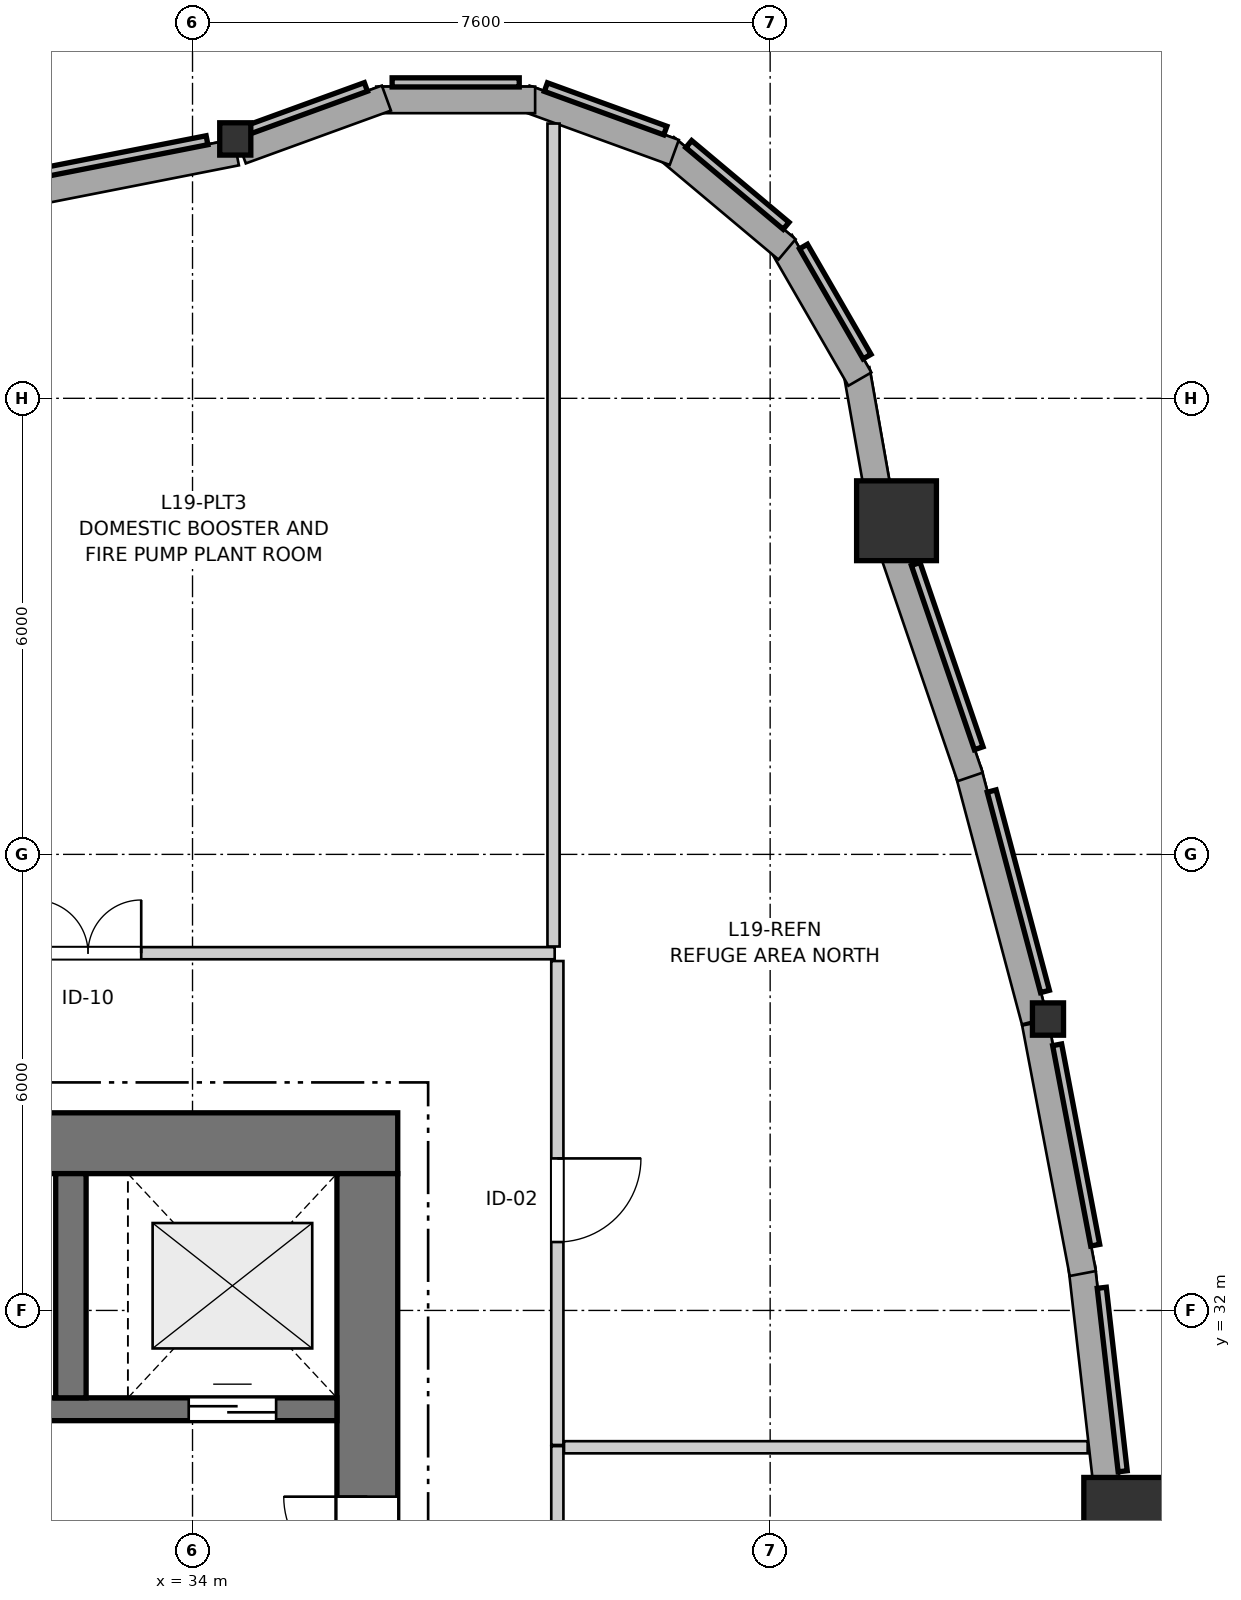
"""IFC4 building model, lengths in metres.
Left out: names, types, materials, properties, quantities, classifications, styles, units other than length and angle.
Written with IfcOpenShell. Run it as: python <this file> out.ifc"""

import sys

from ifc_helpers import new_model, si_unit, direction, frame, frame_2d, origin, origin_2d, place, context, subcontext, project, spatial, rectangle, i_section, extrude, source, transform, mapped, element, fill, save


model = new_model("IFC4")
c1 = context("Model", 3, precision=1e-05, world=origin(), true_north=direction((0.0, 1.0)))
c2 = subcontext(c1, "Body", "Model", "MODEL_VIEW")
j1 = project(units=[si_unit("LENGTHUNIT", "METRE"), si_unit("PLANEANGLEUNIT", "RADIAN")], contexts=[c1])
p1 = place(None, origin())
s1 = spatial("IfcSite", under=j1, at=p1, CompositionType="ELEMENT")
p2 = place(p1, origin())
s2 = spatial("IfcBuilding", under=s1, at=p2, CompositionType="ELEMENT")
p3 = place(p2, frame((0.0, 0.0, 65.4)))
s3 = spatial("IfcBuildingStorey", under=s2, at=p3, CompositionType="ELEMENT", Elevation=65.4)
p4 = place(p3, frame((36.7, 34.2, 0.0), z_axis=(0.0, 0.0, 1.0), x_axis=(-1.0, 0.0, 0.0)))
e1 = element("IfcWall", 1, at=p4, inside=s3, PredefinedType="SHEAR", context=c2, shape_type="SweptSolid", body=[
    extrude(rectangle(XDim=12.7, YDim=0.8, at=frame_2d((6.35, 0.0))), origin(), (0.0, 0.0, 1.0), 4.75),
])
p5 = place(p3, frame((36.3, 18.2, 0.0), z_axis=(0.0, 0.0, 1.0), x_axis=(0.0, 1.0, 0.0)))
e2 = element("IfcWall", 2, at=p5, inside=s3, PredefinedType="SHEAR", context=c2, shape_type="SweptSolid", body=[
    extrude(rectangle(XDim=15.6, YDim=0.8, at=frame_2d((7.8, 0.0))), origin(), (0.0, 0.0, 1.0), 4.75),
])
p6 = place(p5, frame((4.25, 0.0, 0.0)))
e3 = element("IfcOpeningElement", 3, at=p6, cuts=e2, PredefinedType="OPENING", context=c2, shape_type="SweptSolid", body=[
    extrude(rectangle(XDim=1.1, YDim=2.15, at=frame_2d((0.55, 1.075))), frame((0.0, 0.41, 0.0), z_axis=(0.0, -1.0, 0.0), x_axis=(1.0, 0.0, 0.0)), (0.0, 0.0, 1.0), 0.82),
])
p7 = place(p5, frame((10.25, 0.0, 0.0)))
e4 = element("IfcOpeningElement", 4, at=p7, cuts=e2, PredefinedType="OPENING", context=c2, shape_type="SweptSolid", body=[
    extrude(rectangle(XDim=1.1, YDim=2.15, at=frame_2d((0.55, 1.075))), frame((0.0, 0.41, 0.0), z_axis=(0.0, -1.0, 0.0), x_axis=(1.0, 0.0, 0.0)), (0.0, 0.0, 1.0), 0.82),
])
p8 = place(p3, frame((24.8, 30.7, 0.0), z_axis=(0.0, 0.0, 1.0), x_axis=(1.0, 0.0, 0.0)))
e5 = element("IfcWall", 5, at=p8, inside=s3, PredefinedType="SHEAR", context=c2, shape_type="SweptSolid", body=[
    extrude(rectangle(XDim=11.1, YDim=0.3, at=frame_2d((5.55, 0.0))), origin(), (0.0, 0.0, 1.0), 4.75),
])
p9 = place(p8, frame((6.22, 0.0, 0.0)))
e6 = element("IfcOpeningElement", 6, at=p9, cuts=e5, PredefinedType="OPENING", context=c2, shape_type="SweptSolid", body=[
    extrude(rectangle(XDim=0.98, YDim=2.15, at=frame_2d((0.49, 1.075))), frame((0.0, 0.16, 0.0), z_axis=(0.0, -1.0, 0.0), x_axis=(1.0, 0.0, 0.0)), (0.0, 0.0, 1.0), 0.32),
])
p10 = place(p8, frame((9.15, 0.0, 0.0)))
e7 = element("IfcOpeningElement", 7, at=p10, cuts=e5, PredefinedType="OPENING", context=c2, shape_type="SweptSolid", body=[
    extrude(rectangle(XDim=1.15, YDim=2.15, at=frame_2d((0.575, 1.075))), frame((0.0, 0.16, 0.0), z_axis=(0.0, -1.0, 0.0), x_axis=(1.0, 0.0, 0.0)), (0.0, 0.0, 1.0), 0.32),
])
p11 = place(p3, frame((32.4, 30.85, 0.0), z_axis=(0.0, 0.0, 1.0), x_axis=(0.0, 1.0, 0.0)))
e8 = element("IfcWall", 8, at=p11, inside=s3, PredefinedType="SHEAR", context=c2, shape_type="SweptSolid", body=[
    extrude(rectangle(XDim=2.95, YDim=0.4, at=frame_2d((1.475, 0.0))), origin(), (0.0, 0.0, 1.0), 4.75),
])
m1 = source(origin(), c2, "Body", "SweptSolid", [
    extrude(rectangle(XDim=1.05, YDim=1.05, at=origin_2d()), origin(), (0.0, 0.0, 1.0), 4.75),
])
p12 = place(p3, frame((46.252, 29.278, 0.0), z_axis=(0.0, 0.0, 1.0), x_axis=(1.0, 0.0, 0.0)))
e9 = element("IfcColumn", 9, at=p12, inside=s3, PredefinedType="COLUMN", context=c2, shape_type="MappedRepresentation", body=[
    mapped(m1, transform((0.0, 0.0, 0.0), x_axis=(1.0, 0.0, 0.0), y_axis=(0.0, 1.0, 0.0), z_axis=(0.0, 0.0, 1.0), scale=1.0)),
])
m2 = source(origin(), c2, "Body", "SweptSolid", [
    extrude(i_section(OverallWidth=0.409, OverallDepth=0.425, WebThickness=0.03, FlangeThickness=0.048, FilletRadius=0.015, at=origin_2d()), origin(), (0.0, 0.0, 1.0), 4.75),
])
p13 = place(p3, frame((45.256, 35.834, 0.0), z_axis=(0.0, 0.0, 1.0), x_axis=(1.0, 0.0, 0.0)))
e10 = element("IfcColumn", 10, at=p13, inside=s3, PredefinedType="PILASTER", context=c2, shape_type="MappedRepresentation", body=[
    mapped(m2, transform((0.0, 0.0, 0.0), x_axis=(1.0, 0.0, 0.0), y_axis=(0.0, 1.0, 0.0), z_axis=(0.0, 0.0, 1.0), scale=1.0)),
])
p14 = place(p3, frame((43.262, 42.389, 0.0), z_axis=(0.0, 0.0, 1.0), x_axis=(1.0, 0.0, 0.0)))
e11 = element("IfcColumn", 11, at=p14, inside=s3, PredefinedType="COLUMN", context=c2, shape_type="MappedRepresentation", body=[
    mapped(m1, transform((0.0, 0.0, 0.0), x_axis=(1.0, 0.0, 0.0), y_axis=(0.0, 1.0, 0.0), z_axis=(0.0, 0.0, 1.0), scale=1.0)),
])
p15 = place(p3, frame((34.562, 47.413, 0.0), z_axis=(0.0, 0.0, 1.0), x_axis=(1.0, 0.0, 0.0)))
e12 = element("IfcColumn", 12, at=p15, inside=s3, PredefinedType="PILASTER", context=c2, shape_type="MappedRepresentation", body=[
    mapped(m2, transform((0.0, 0.0, 0.0), x_axis=(1.0, 0.0, 0.0), y_axis=(0.0, 1.0, 0.0), z_axis=(0.0, 0.0, 1.0), scale=1.0)),
])
p16 = place(p3, frame((46.044, 29.556, 0.0), z_axis=(0.0, 0.0, 1.0), x_axis=(-0.113263196818, 0.993565019637, 0.0)))
e13 = element("IfcWall", 13, at=p16, inside=s3, PredefinedType="SOLIDWALL", context=c2, shape_type="SweptSolid", body=[
    extrude(rectangle(XDim=3.037, YDim=0.35, at=frame_2d((1.519, 0.0))), origin(), (0.0, 0.0, 1.0), 4.23),
])
p17 = place(p3, frame((45.713, 32.486, 0.0), z_axis=(0.0, 0.0, 1.0), x_axis=(-0.186603748992, 0.982435260392, 0.0)))
e14 = element("IfcWall", 14, at=p17, inside=s3, PredefinedType="SOLIDWALL", context=c2, shape_type="SweptSolid", body=[
    extrude(rectangle(XDim=3.354, YDim=0.35, at=frame_2d((1.677, 0.0))), origin(), (0.0, 0.0, 1.0), 4.23),
])
p18 = place(p3, frame((45.081, 35.808, 0.0), z_axis=(0.0, 0.0, 1.0), x_axis=(-0.257114470429, 0.966380954436, 0.0)))
e15 = element("IfcWall", 15, at=p18, inside=s3, PredefinedType="SOLIDWALL", context=c2, shape_type="SweptSolid", body=[
    extrude(rectangle(XDim=3.41, YDim=0.35, at=frame_2d((1.705, 0.0))), origin(), (0.0, 0.0, 1.0), 4.23),
])
p19 = place(p3, frame((44.23, 39.019, 0.0), z_axis=(0.0, 0.0, 1.0), x_axis=(-0.323560153501, 0.94620760252, 0.0)))
e16 = element("IfcWall", 16, at=p19, inside=s3, PredefinedType="SOLIDWALL", context=c2, shape_type="SweptSolid", body=[
    extrude(rectangle(XDim=3.202, YDim=0.35, at=frame_2d((1.601, 0.0))), origin(), (0.0, 0.0, 1.0), 4.23),
])
p20 = place(p3, frame((43.038, 42.655, 0.0), z_axis=(0.0, 0.0, 1.0), x_axis=(-0.173610462023, 0.984814402553, 0.0)))
e17 = element("IfcWall", 17, at=p20, inside=s3, PredefinedType="SOLIDWALL", context=c2, shape_type="SweptSolid", body=[
    extrude(rectangle(XDim=1.752, YDim=0.35, at=frame_2d((0.876, 0.0))), origin(), (0.0, 0.0, 1.0), 4.23),
])
for number, where, z_axis, x_axis in (
    (18, (42.78, 44.253, 0.0), (0.0, 0.0, 1.0), (-0.5, 0.866, 0.0)),
    (19, (41.822, 45.959, 0.0), (0.0, 0.0, 1.0), (-0.766, 0.643, 0.0)),
    (20, (40.338, 47.235, 0.0), (0.0, 0.0, 1.0), (-0.94, 0.342, 0.0)),
):
    element("IfcWall", number, at=place(p3, frame(where, z_axis=z_axis, x_axis=x_axis)), inside=s3, PredefinedType="SOLIDWALL", context=c2, shape_type="SweptSolid", body=[
        extrude(rectangle(XDim=2.09, YDim=0.35, at=frame_2d((1.045, 0.0))), origin(), (0.0, 0.0, 1.0), 4.23),
    ])
p21 = place(p3, frame((38.508, 47.927, 0.0), z_axis=(0.0, 0.0, 1.0), x_axis=(-1.0, 0.0, 0.0)))
e21 = element("IfcWall", 21, at=p21, inside=s3, PredefinedType="SOLIDWALL", context=c2, shape_type="SweptSolid", body=[
    extrude(rectangle(XDim=2.091, YDim=0.35, at=frame_2d((1.045, 0.0))), origin(), (0.0, 0.0, 1.0), 4.23),
])
p22 = place(p3, frame((36.551, 47.95, 0.0), z_axis=(0.0, 0.0, 1.0), x_axis=(-0.939691662178, -0.342022777067, 0.0)))
e22 = element("IfcWall", 22, at=p22, inside=s3, PredefinedType="SOLIDWALL", context=c2, shape_type="SweptSolid", body=[
    extrude(rectangle(XDim=2.032, YDim=0.35, at=frame_2d((1.016, 0.0))), origin(), (0.0, 0.0, 1.0), 4.23),
])
p23 = place(p3, frame((34.577, 47.237, 0.0), z_axis=(0.0, 0.0, 1.0), x_axis=(-0.981238400755, -0.192798342532, 0.0)))
e23 = element("IfcWall", 23, at=p23, inside=s3, PredefinedType="SOLIDWALL", context=c2, shape_type="SweptSolid", body=[
    extrude(rectangle(XDim=3.482, YDim=0.35, at=frame_2d((1.741, 0.0))), origin(), (0.0, 0.0, 1.0), 4.23),
])
p24 = place(p3, frame((26.485, 36.7, 0.0), z_axis=(0.0, 0.0, 1.0), x_axis=(1.0, 0.0, 0.0)))
e24 = element("IfcWall", 24, at=p24, inside=s3, PredefinedType="PARTITIONING", context=c2, shape_type="SweptSolid", body=[
    extrude(rectangle(XDim=12.28, YDim=0.16, at=frame_2d((6.14, 0.0))), origin(), (0.0, 0.0, 1.0), 4.218),
])
p25 = place(p24, frame((5.44, 0.0, 0.0)))
e25 = element("IfcOpeningElement", 25, at=p25, cuts=e24, PredefinedType="OPENING", context=c2, shape_type="SweptSolid", body=[
    extrude(rectangle(XDim=1.4, YDim=2.15, at=frame_2d((0.7, 1.075))), frame((0.0, 0.09, 0.0), z_axis=(0.0, -1.0, 0.0), x_axis=(1.0, 0.0, 0.0)), (0.0, 0.0, 1.0), 0.18),
])
p26 = place(p3, frame((38.8, 30.215, 0.0), z_axis=(0.0, 0.0, 1.0), x_axis=(0.0, -1.0, 0.0)))
e26 = element("IfcWall", 26, at=p26, inside=s3, PredefinedType="PARTITIONING", context=c2, shape_type="SweptSolid", body=[
    extrude(rectangle(XDim=8.43, YDim=0.16, at=frame_2d((4.215, 0.0))), origin(), (0.0, 0.0, 1.0), 4.75),
])
p27 = place(p26, frame((3.515, 0.0, 0.0)))
e27 = element("IfcOpeningElement", 27, at=p27, cuts=e26, PredefinedType="OPENING", context=c2, shape_type="SweptSolid", body=[
    extrude(rectangle(XDim=1.4, YDim=2.15, at=frame_2d((0.7, 1.075))), frame((0.0, 0.09, 0.0), z_axis=(0.0, -1.0, 0.0), x_axis=(1.0, 0.0, 0.0)), (0.0, 0.0, 1.0), 0.18),
])
p28 = place(p3, frame((38.8, 36.597, 0.0), z_axis=(0.0, 0.0, 1.0), x_axis=(0.0, -1.0, 0.0)))
e28 = element("IfcWall", 28, at=p28, inside=s3, PredefinedType="PARTITIONING", context=c2, shape_type="SweptSolid", body=[
    extrude(rectangle(XDim=6.367, YDim=0.16, at=frame_2d((3.184, 0.0))), origin(), (0.0, 0.0, 1.0), 4.218),
])
p29 = place(p28, frame((2.597, 0.0, 0.0)))
e29 = element("IfcOpeningElement", 29, at=p29, cuts=e28, PredefinedType="OPENING", context=c2, shape_type="SweptSolid", body=[
    extrude(rectangle(XDim=1.1, YDim=2.15, at=frame_2d((0.55, 1.075))), frame((0.0, 0.09, 0.0), z_axis=(0.0, -1.0, 0.0), x_axis=(1.0, 0.0, 0.0)), (0.0, 0.0, 1.0), 0.18),
])
p30 = place(p3, frame((38.75, 36.788, 0.0), z_axis=(0.0, 0.0, 1.0), x_axis=(0.0, 1.0, 0.0)))
e30 = element("IfcWall", 30, at=p30, inside=s3, PredefinedType="PARTITIONING", context=c2, shape_type="SweptSolid", body=[
    extrude(rectangle(XDim=10.827, YDim=0.16, at=frame_2d((5.414, 0.0))), origin(), (0.0, 0.0, 1.0), 4.75),
])
p31 = place(p3, frame((38.888, 30.2, 0.0), z_axis=(0.0, 0.0, 1.0), x_axis=(1.0, 0.0, 0.0)))
e31 = element("IfcWall", 31, at=p31, inside=s3, PredefinedType="PARTITIONING", context=c2, shape_type="SweptSolid", body=[
    extrude(rectangle(XDim=6.889, YDim=0.16, at=frame_2d((3.445, 0.0))), origin(), (0.0, 0.0, 1.0), 4.75),
])
m3 = source(origin(), c2, "Body", "SweptSolid", [
    extrude(rectangle(XDim=1.15, YDim=2.15, at=frame_2d((0.575, 1.075))), frame((0.0, 0.025, 0.0), z_axis=(0.0, -1.0, 0.0), x_axis=(1.0, 0.0, 0.0)), (0.0, 0.0, 1.0), 0.05),
])
p32 = place(p10, origin())
e32 = element("IfcDoor", 32, at=p32, inside=s3, OperationType="DOUBLE_DOOR_SLIDING", PredefinedType="DOOR", context=c2, shape_type="MappedRepresentation", body=[
    mapped(m3, transform((0.0, 0.0, 0.0), x_axis=(1.0, 0.0, 0.0), y_axis=(0.0, 1.0, 0.0), z_axis=(0.0, 0.0, 1.0), scale=1.0)),
])
fill(e7, e32)
m4 = source(origin(), c2, "Body", "SweptSolid", [
    extrude(rectangle(XDim=1.1, YDim=2.15, at=frame_2d((0.55, 1.075))), frame((0.0, 0.025, 0.0), z_axis=(0.0, -1.0, 0.0), x_axis=(1.0, 0.0, 0.0)), (0.0, 0.0, 1.0), 0.05),
])
p33 = place(p7, origin())
e33 = element("IfcDoor", 33, at=p33, inside=s3, OperationType="SINGLE_SWING_RIGHT", PredefinedType="DOOR", context=c2, shape_type="MappedRepresentation", body=[
    mapped(m4, transform((0.0, 0.0, 0.0), x_axis=(1.0, 0.0, 0.0), y_axis=(0.0, 1.0, 0.0), z_axis=(0.0, 0.0, 1.0), scale=1.0)),
])
fill(e4, e33)
m5 = source(origin(), c2, "Body", "SweptSolid", [
    extrude(rectangle(XDim=1.4, YDim=2.15, at=frame_2d((0.7, 1.075))), frame((0.0, 0.025, 0.0), z_axis=(0.0, -1.0, 0.0), x_axis=(1.0, 0.0, 0.0)), (0.0, 0.0, 1.0), 0.05),
])
p34 = place(p25, origin())
e34 = element("IfcDoor", 34, at=p34, inside=s3, OperationType="DOUBLE_DOOR_SINGLE_SWING", PredefinedType="DOOR", context=c2, shape_type="MappedRepresentation", body=[
    mapped(m5, transform((0.0, 0.0, 0.0), x_axis=(1.0, 0.0, 0.0), y_axis=(0.0, 1.0, 0.0), z_axis=(0.0, 0.0, 1.0), scale=1.0)),
])
fill(e25, e34)
p35 = place(p29, origin())
e35 = element("IfcDoor", 35, at=p35, inside=s3, OperationType="SINGLE_SWING_LEFT", PredefinedType="DOOR", context=c2, shape_type="MappedRepresentation", body=[
    mapped(m4, transform((0.0, 0.0, 0.0), x_axis=(1.0, 0.0, 0.0), y_axis=(0.0, 1.0, 0.0), z_axis=(0.0, 0.0, 1.0), scale=1.0)),
])
fill(e29, e35)
save(model, sys.argv[1])
